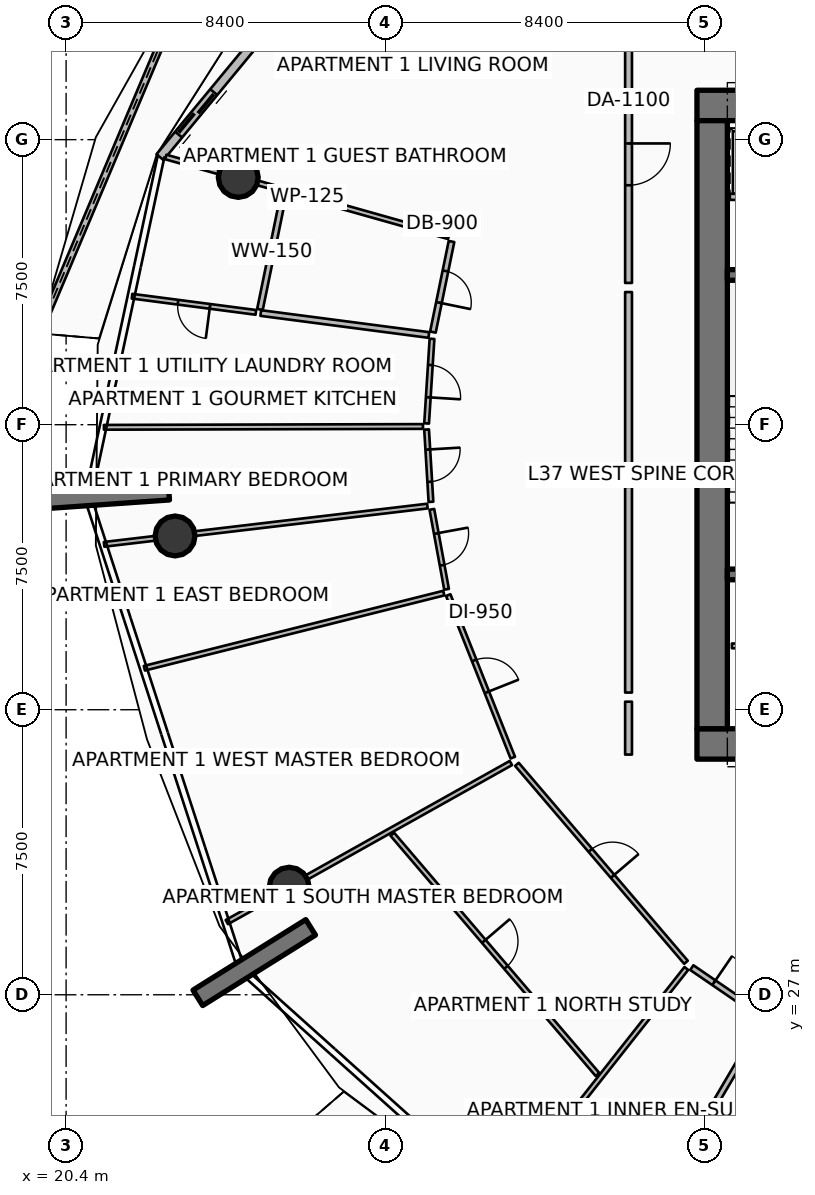
"""IFC4 building model, lengths in metres.
Left out: names, types, materials, properties, quantities, classifications, styles, units other than length and angle.
Written with IfcOpenShell. Run it as: python <this file> out.ifc"""

import sys

from ifc_helpers import new_model, si_unit, direction, frame, frame_2d, origin, origin_2d, place, context, subcontext, project, spatial, polyline, rectangle, circle, outline, extrude, element, fill, save


model = new_model("IFC4")
c1 = context("Model", 3, precision=1e-05, world=origin(), true_north=direction((0.0, 1.0)))
c2 = subcontext(c1, "Body", "Model", "MODEL_VIEW")
j1 = project(units=[si_unit("LENGTHUNIT", "METRE"), si_unit("PLANEANGLEUNIT", "RADIAN")], contexts=[c1])
p1 = place(None, origin())
s1 = spatial("IfcSite", under=j1, at=p1, CompositionType="ELEMENT")
p2 = place(p1, origin())
s2 = spatial("IfcBuilding", under=s1, at=p2, CompositionType="ELEMENT")
p3 = place(p2, frame((0.0, 0.0, 150.3)))
s3 = spatial("IfcBuildingStorey", under=s2, at=p3, CompositionType="ELEMENT", Elevation=150.3)
for number, where, z_axis, x_axis in (
    (1, (37.0, 33.6, 0.0), (0.0, 0.0, 1.0), (1.0, 0.0, 0.0)),
    (2, (37.0, 50.4, 0.0), (0.0, 0.0, 1.0), (1.0, 0.0, 0.0)),
):
    element("IfcWall", number, at=place(p3, frame(where, z_axis=z_axis, x_axis=x_axis)), inside=s3, PredefinedType="SHEAR", context=c2, shape_type="SweptSolid", body=[
        extrude(rectangle(XDim=9.9, YDim=0.8, at=frame_2d((4.95, 0.0))), origin(), (0.0, 0.0, 1.0), 3.75),
    ])
p4 = place(p3, frame((37.4, 34.0, 0.0), z_axis=(0.0, 0.0, 1.0), x_axis=(0.0, 1.0, 0.0)))
e3 = element("IfcWall", 3, at=p4, inside=s3, PredefinedType="SHEAR", context=c2, shape_type="SweptSolid", body=[
    extrude(rectangle(XDim=16.0, YDim=0.8, at=frame_2d((8.0, 0.0))), origin(), (0.0, 0.0, 1.0), 3.75),
])
for number, where, z_axis, x_axis in (
    (4, (37.8, 38.06, 0.0), (0.0, 0.0, 1.0), (1.0, 0.0, 0.0)),
    (5, (37.8, 45.94, 0.0), (0.0, 0.0, 1.0), (1.0, 0.0, 0.0)),
):
    element("IfcWall", number, at=place(p3, frame(where, z_axis=z_axis, x_axis=x_axis)), inside=s3, PredefinedType="SHEAR", context=c2, shape_type="SweptSolid", body=[
        extrude(rectangle(XDim=3.5, YDim=0.28, at=frame_2d((1.75, 0.0))), origin(), (0.0, 0.0, 1.0), 3.75),
    ])
for number, where, z_axis, x_axis in (
    (6, (23.103, 40.259, 0.0), (0.0, 0.0, 1.0), (-0.998, -0.07, 0.0)),
    (7, (26.835, 28.774, 0.0), (0.0, 0.0, 1.0), (-0.848, -0.53, 0.0)),
):
    element("IfcWall", number, at=place(p3, frame(where, z_axis=z_axis, x_axis=x_axis)), inside=s3, PredefinedType="SOLIDWALL", context=c2, shape_type="SweptSolid", body=[
        extrude(rectangle(XDim=3.5, YDim=0.48, at=frame_2d((1.75, 0.0))), origin(), (0.0, 0.0, 1.0), 3.75),
    ])
for number, where, z_axis, x_axis in (
    (8, (24.93, 48.506, 0.0), (0.0, 0.0, 1.0), (1.0, 0.0, 0.0)),
    (9, (23.267, 39.073, 0.0), (0.0, 0.0, 1.0), (1.0, 0.0, 0.0)),
    (10, (26.27, 29.831, 0.0), (0.0, 0.0, 1.0), (1.0, 0.0, 0.0)),
):
    element("IfcColumn", number, at=place(p3, frame(where, z_axis=z_axis, x_axis=x_axis)), inside=s3, PredefinedType="COLUMN", context=c2, shape_type="SweptSolid", body=[
        extrude(circle(Radius=0.525, at=origin_2d()), origin(), (0.0, 0.0, 1.0), 3.5),
    ])
p5 = place(p3, frame((23.804, 54.194, 0.0), z_axis=(0.0, 0.0, 1.0), x_axis=(-0.388680391431, -0.921372646282, 0.0)))
e11 = element("IfcWall", 11, at=p5, inside=s3, PredefinedType="PARAPET", context=c2, shape_type="SweptSolid", body=[
    extrude(outline(polyline([(0.0, 0.0), (10.626, 0.0), (10.626, 1.12), (5.313, 1.182), (0.0, 1.348), (0.0, 0.0)])), frame((0.0, 0.09, 0.0), z_axis=(0.0, -1.0, 0.0), x_axis=(1.0, 0.0, 0.0)), (0.0, 0.0, 1.0), 0.18),
])
p6 = place(p3, frame((29.291, 56.813, 0.0), z_axis=(0.0, 0.0, 1.0), x_axis=(-0.636771922292, -0.77105221547, 0.0)))
e12 = element("IfcWall", 12, at=p6, inside=s3, PredefinedType="SOLIDWALL", context=c2, shape_type="SweptSolid", body=[
    extrude(rectangle(XDim=10.082, YDim=0.24, at=frame_2d((5.041, 0.0))), origin(), (0.0, 0.0, 1.0), 2.45),
])
p7 = place(p6, frame((7.862, 0.0, 0.0)))
e13 = element("IfcOpeningElement", 13, at=p7, cuts=e12, PredefinedType="OPENING", context=c2, shape_type="SweptSolid", body=[
    extrude(rectangle(XDim=1.45, YDim=2.15, at=frame_2d((0.725, 1.075))), frame((0.0, 0.13, 0.0), z_axis=(0.0, -1.0, 0.0), x_axis=(1.0, 0.0, 0.0)), (0.0, 0.0, 1.0), 0.26),
])
p8 = place(p6, frame((0.28, 0.0, 0.65)))
e14 = element("IfcOpeningElement", 14, at=p8, cuts=e12, PredefinedType="OPENING", context=c2, shape_type="SweptSolid", body=[
    extrude(rectangle(XDim=1.6, YDim=1.5, at=frame_2d((0.8, 0.75))), frame((0.0, 0.13, 0.0), z_axis=(0.0, -1.0, 0.0), x_axis=(1.0, 0.0, 0.0)), (0.0, 0.0, 1.0), 0.26),
])
p9 = place(p3, frame((39.975, 47.995, 0.0), z_axis=(0.0, 0.0, 1.0), x_axis=(-1.0, 0.0, 0.0)))
e15 = element("IfcWall", 15, at=p9, inside=s3, PredefinedType="PARTITIONING", context=c2, shape_type="SweptSolid", body=[
    extrude(rectangle(XDim=2.11, YDim=0.16, at=frame_2d((1.055, 0.0))), origin(), (0.0, 0.0, 1.0), 3.5),
])
p10 = place(p9, frame((0.505, 0.0, 0.0)))
e16 = element("IfcOpeningElement", 16, at=p10, cuts=e15, PredefinedType="OPENING", context=c2, shape_type="SweptSolid", body=[
    extrude(rectangle(XDim=1.1, YDim=2.1, at=frame_2d((0.55, 1.05))), frame((0.0, 0.09, 0.0), z_axis=(0.0, -1.0, 0.0), x_axis=(1.0, 0.0, 0.0)), (0.0, 0.0, 1.0), 0.18),
])
p11 = place(p3, frame((37.92, 36.18, 0.0), z_axis=(0.0, 0.0, 1.0), x_axis=(1.0, 0.0, 0.0)))
e17 = element("IfcWall", 17, at=p11, inside=s3, PredefinedType="PARTITIONING", context=c2, shape_type="SweptSolid", body=[
    extrude(rectangle(XDim=3.33, YDim=0.125, at=frame_2d((1.665, 0.0))), origin(), (0.0, 0.0, 1.0), 2.94),
])
p12 = place(p11, frame((1.24, 0.0, 0.0)))
e18 = element("IfcOpeningElement", 18, at=p12, cuts=e17, PredefinedType="OPENING", context=c2, shape_type="SweptSolid", body=[
    extrude(rectangle(XDim=0.85, YDim=2.06, at=frame_2d((0.425, 1.03))), frame((0.0, 0.073, 0.0), z_axis=(0.0, -1.0, 0.0), x_axis=(1.0, 0.0, 0.0)), (0.0, 0.0, 1.0), 0.145),
])
p13 = place(p3, frame((35.2, 51.971, 0.0), z_axis=(0.0, 0.0, 1.0), x_axis=(0.0, -1.0, 0.0)))
e19 = element("IfcWall", 19, at=p13, inside=s3, PredefinedType="PARTITIONING", context=c2, shape_type="SweptSolid", body=[
    extrude(rectangle(XDim=6.241, YDim=0.18, at=frame_2d((3.12, 0.0))), origin(), (0.0, 0.0, 1.0), 2.94),
])
p14 = place(p13, frame((2.57, 0.0, 0.0)))
e20 = element("IfcOpeningElement", 20, at=p14, cuts=e19, PredefinedType="OPENING", context=c2, shape_type="SweptSolid", body=[
    extrude(rectangle(XDim=1.1, YDim=2.1, at=frame_2d((0.55, 1.05))), frame((0.0, 0.1, 0.0), z_axis=(0.0, -1.0, 0.0), x_axis=(1.0, 0.0, 0.0)), (0.0, 0.0, 1.0), 0.2),
])
p15 = place(p3, frame((35.2, 45.49, 0.0), z_axis=(0.0, 0.0, 1.0), x_axis=(0.0, -1.0, 0.0)))
e21 = element("IfcWall", 21, at=p15, inside=s3, PredefinedType="PARTITIONING", context=c2, shape_type="SweptSolid", body=[
    extrude(rectangle(XDim=4.885, YDim=0.18, at=frame_2d((2.442, 0.0))), origin(), (0.0, 0.0, 1.0), 2.94),
])
p16 = place(p3, frame((30.465, 46.945, 0.0), z_axis=(0.0, 0.0, 1.0), x_axis=(-0.962456021196, 0.271437667363, 0.0)))
e22 = element("IfcWall", 22, at=p16, inside=s3, PredefinedType="PARTITIONING", context=c2, shape_type="SweptSolid", body=[
    extrude(rectangle(XDim=7.732, YDim=0.125, at=frame_2d((3.866, 0.0))), origin(), (0.0, 0.0, 1.0), 2.94),
])
p17 = place(p3, frame((30.541, 46.82, 0.0), z_axis=(0.0, 0.0, 1.0), x_axis=(-0.201072520907, -0.979576358094, 0.0)))
e23 = element("IfcWall", 23, at=p17, inside=s3, PredefinedType="PARTITIONING", context=c2, shape_type="SweptSolid", body=[
    extrude(rectangle(XDim=2.433, YDim=0.15, at=frame_2d((1.217, 0.0))), origin(), (0.0, 0.0, 1.0), 2.94),
])
p18 = place(p17, frame((0.792, 0.0, 0.0)))
e24 = element("IfcOpeningElement", 24, at=p18, cuts=e23, PredefinedType="OPENING", context=c2, shape_type="SweptSolid", body=[
    extrude(rectangle(XDim=0.85, YDim=2.06, at=frame_2d((0.425, 1.03))), frame((0.0, 0.085, 0.0), z_axis=(0.0, -1.0, 0.0), x_axis=(1.0, 0.0, 0.0)), (0.0, 0.0, 1.0), 0.17),
])
p19 = place(p3, frame((26.124, 48.066, 0.0), z_axis=(0.0, 0.0, 1.0), x_axis=(-0.201054681034, -0.979580019822, 0.0)))
e25 = element("IfcWall", 25, at=p19, inside=s3, PredefinedType="PARTITIONING", context=c2, shape_type="SweptSolid", body=[
    extrude(rectangle(XDim=3.098, YDim=0.15, at=frame_2d((1.549, 0.0))), origin(), (0.0, 0.0, 1.0), 2.94),
])
p20 = place(p3, frame((29.945, 44.36, 0.0), z_axis=(0.0, 0.0, 1.0), x_axis=(-0.991563130501, 0.129624682181, 0.0)))
e26 = element("IfcWall", 26, at=p20, inside=s3, PredefinedType="PARTITIONING", context=c2, shape_type="SweptSolid", body=[
    extrude(rectangle(XDim=4.46, YDim=0.15, at=frame_2d((2.23, 0.0))), origin(), (0.0, 0.0, 1.0), 2.94),
])
p21 = place(p3, frame((25.393, 44.955, 0.0), z_axis=(0.0, 0.0, 1.0), x_axis=(-0.991560176963, 0.12964727325, 0.0)))
e27 = element("IfcWall", 27, at=p21, inside=s3, PredefinedType="PARTITIONING", context=c2, shape_type="SweptSolid", body=[
    extrude(rectangle(XDim=3.286, YDim=0.125, at=frame_2d((1.643, 0.0))), origin(), (0.0, 0.0, 1.0), 2.94),
])
p22 = place(p21, frame((1.218, 0.0, 0.0)))
e28 = element("IfcOpeningElement", 28, at=p22, cuts=e27, PredefinedType="OPENING", context=c2, shape_type="SweptSolid", body=[
    extrude(rectangle(XDim=0.85, YDim=2.06, at=frame_2d((0.425, 1.03))), frame((0.0, 0.073, 0.0), z_axis=(0.0, -1.0, 0.0), x_axis=(1.0, 0.0, 0.0)), (0.0, 0.0, 1.0), 0.145),
])
p23 = place(p3, frame((29.791, 41.953, 0.0), z_axis=(0.0, 0.0, 1.0), x_axis=(-0.999996651439, -0.0025878777, 0.0)))
e29 = element("IfcWall", 29, at=p23, inside=s3, PredefinedType="PARTITIONING", context=c2, shape_type="SweptSolid", body=[
    extrude(rectangle(XDim=8.396, YDim=0.125, at=frame_2d((4.198, 0.0))), origin(), (0.0, 0.0, 1.0), 2.94),
])
p24 = place(p3, frame((30.028, 44.259, 0.0), z_axis=(0.0, 0.0, 1.0), x_axis=(-0.063707112834, -0.997968638673, 0.0)))
e30 = element("IfcWall", 30, at=p24, inside=s3, PredefinedType="PARTITIONING", context=c2, shape_type="SweptSolid", body=[
    extrude(rectangle(XDim=2.23, YDim=0.125, at=frame_2d((1.115, 0.0))), origin(), (0.0, 0.0, 1.0), 2.94),
])
p25 = place(p24, frame((0.69, 0.0, 0.0)))
e31 = element("IfcOpeningElement", 31, at=p25, cuts=e30, PredefinedType="OPENING", context=c2, shape_type="SweptSolid", body=[
    extrude(rectangle(XDim=0.85, YDim=2.06, at=frame_2d((0.425, 1.03))), frame((0.0, 0.073, 0.0), z_axis=(0.0, -1.0, 0.0), x_axis=(1.0, 0.0, 0.0)), (0.0, 0.0, 1.0), 0.145),
])
p26 = place(p3, frame((29.886, 41.873, 0.0), z_axis=(0.0, 0.0, 1.0), x_axis=(0.060058165276, -0.998194879161, 0.0)))
e32 = element("IfcWall", 32, at=p26, inside=s3, PredefinedType="PARTITIONING", context=c2, shape_type="SweptSolid", body=[
    extrude(rectangle(XDim=1.906, YDim=0.125, at=frame_2d((0.953, 0.0))), origin(), (0.0, 0.0, 1.0), 2.94),
])
p27 = place(p26, frame((0.528, 0.0, 0.0)))
e33 = element("IfcOpeningElement", 33, at=p27, cuts=e32, PredefinedType="OPENING", context=c2, shape_type="SweptSolid", body=[
    extrude(rectangle(XDim=0.85, YDim=2.06, at=frame_2d((0.425, 1.03))), frame((0.0, 0.073, 0.0), z_axis=(0.0, -1.0, 0.0), x_axis=(1.0, 0.0, 0.0)), (0.0, 0.0, 1.0), 0.145),
])
p28 = place(p3, frame((35.2, 40.365, 0.0), z_axis=(0.0, 0.0, 1.0), x_axis=(0.0, -1.0, 0.0)))
e34 = element("IfcWall", 34, at=p28, inside=s3, PredefinedType="PARTITIONING", context=c2, shape_type="SweptSolid", body=[
    extrude(rectangle(XDim=5.413, YDim=0.18, at=frame_2d((2.707, 0.0))), origin(), (0.0, 0.0, 1.0), 2.94),
])
p29 = place(p3, frame((29.907, 39.858, 0.0), z_axis=(0.0, 0.0, 1.0), x_axis=(-0.993070228419, -0.117522429465, 0.0)))
e35 = element("IfcWall", 35, at=p29, inside=s3, PredefinedType="PARTITIONING", context=c2, shape_type="SweptSolid", body=[
    extrude(rectangle(XDim=8.567, YDim=0.125, at=frame_2d((4.284, 0.0))), origin(), (0.0, 0.0, 1.0), 2.94),
])
p30 = place(p3, frame((30.338, 37.569, 0.0), z_axis=(0.0, 0.0, 1.0), x_axis=(-0.969940631235, -0.243341677236, 0.0)))
e36 = element("IfcWall", 36, at=p30, inside=s3, PredefinedType="PARTITIONING", context=c2, shape_type="SweptSolid", body=[
    extrude(rectangle(XDim=8.124, YDim=0.125, at=frame_2d((4.062, 0.0))), origin(), (0.0, 0.0, 1.0), 2.94),
])
p31 = place(p3, frame((30.025, 39.772, 0.0), z_axis=(0.0, 0.0, 1.0), x_axis=(0.180764237825, -0.983526456341, 0.0)))
e37 = element("IfcWall", 37, at=p31, inside=s3, PredefinedType="PARTITIONING", context=c2, shape_type="SweptSolid", body=[
    extrude(rectangle(XDim=2.138, YDim=0.125, at=frame_2d((1.069, 0.0))), origin(), (0.0, 0.0, 1.0), 2.94),
])
p32 = place(p31, frame((0.644, 0.0, 0.0)))
e38 = element("IfcOpeningElement", 38, at=p32, cuts=e37, PredefinedType="OPENING", context=c2, shape_type="SweptSolid", body=[
    extrude(rectangle(XDim=0.85, YDim=2.06, at=frame_2d((0.425, 1.03))), frame((0.0, 0.073, 0.0), z_axis=(0.0, -1.0, 0.0), x_axis=(1.0, 0.0, 0.0)), (0.0, 0.0, 1.0), 0.145),
])
p33 = place(p3, frame((30.455, 37.516, 0.0), z_axis=(0.0, 0.0, 1.0), x_axis=(0.369249273076, -0.929330390299, 0.0)))
e39 = element("IfcWall", 39, at=p33, inside=s3, PredefinedType="PARTITIONING", context=c2, shape_type="SweptSolid", body=[
    extrude(rectangle(XDim=4.602, YDim=0.125, at=frame_2d((2.301, 0.0))), origin(), (0.0, 0.0, 1.0), 2.94),
])
p34 = place(p33, frame((1.851, 0.0, 0.0)))
e40 = element("IfcOpeningElement", 40, at=p34, cuts=e39, PredefinedType="OPENING", context=c2, shape_type="SweptSolid", body=[
    extrude(rectangle(XDim=0.9, YDim=2.08, at=frame_2d((0.45, 1.04))), frame((0.0, 0.073, 0.0), z_axis=(0.0, -1.0, 0.0), x_axis=(1.0, 0.0, 0.0)), (0.0, 0.0, 1.0), 0.145),
])
p35 = place(p3, frame((35.2, 34.712, 0.0), z_axis=(0.0, 0.0, 1.0), x_axis=(0.0, -1.0, 0.0)))
e41 = element("IfcWall", 41, at=p35, inside=s3, PredefinedType="PARTITIONING", context=c2, shape_type="SweptSolid", body=[
    extrude(rectangle(XDim=1.392, YDim=0.18, at=frame_2d((0.696, 0.0))), origin(), (0.0, 0.0, 1.0), 2.94),
])
p36 = place(p3, frame((32.104, 33.098, 0.0), z_axis=(0.0, 0.0, 1.0), x_axis=(-0.872488035617, -0.488635475283, 0.0)))
e42 = element("IfcWall", 42, at=p36, inside=s3, PredefinedType="PARTITIONING", context=c2, shape_type="SweptSolid", body=[
    extrude(rectangle(XDim=8.567, YDim=0.125, at=frame_2d((4.284, 0.0))), origin(), (0.0, 0.0, 1.0), 2.94),
])
p37 = place(p3, frame((32.263, 33.063, 0.0), z_axis=(0.0, 0.0, 1.0), x_axis=(0.649448927448, -0.760405214762, 0.0)))
e43 = element("IfcWall", 43, at=p37, inside=s3, PredefinedType="PARTITIONING", context=c2, shape_type="SweptSolid", body=[
    extrude(rectangle(XDim=6.85, YDim=0.125, at=frame_2d((3.425, 0.0))), origin(), (0.0, 0.0, 1.0), 2.94),
])
p38 = place(p37, frame((2.975, 0.0, 0.0)))
e44 = element("IfcOpeningElement", 44, at=p38, cuts=e43, PredefinedType="OPENING", context=c2, shape_type="SweptSolid", body=[
    extrude(rectangle(XDim=0.9, YDim=2.08, at=frame_2d((0.45, 1.04))), frame((0.0, 0.073, 0.0), z_axis=(0.0, -1.0, 0.0), x_axis=(1.0, 0.0, 0.0)), (0.0, 0.0, 1.0), 0.145),
])
p39 = place(p3, frame((28.982, 31.226, 0.0), z_axis=(0.0, 0.0, 1.0), x_axis=(0.649429273824, -0.760422000142, 0.0)))
e45 = element("IfcWall", 45, at=p39, inside=s3, PredefinedType="PARTITIONING", context=c2, shape_type="SweptSolid", body=[
    extrude(rectangle(XDim=8.317, YDim=0.125, at=frame_2d((4.158, 0.0))), origin(), (0.0, 0.0, 1.0), 2.94),
])
p40 = place(p39, frame((3.708, 0.0, 0.0)))
e46 = element("IfcOpeningElement", 46, at=p40, cuts=e45, PredefinedType="OPENING", context=c2, shape_type="SweptSolid", body=[
    extrude(rectangle(XDim=0.9, YDim=2.08, at=frame_2d((0.45, 1.04))), frame((0.0, 0.073, 0.0), z_axis=(0.0, -1.0, 0.0), x_axis=(1.0, 0.0, 0.0)), (0.0, 0.0, 1.0), 0.145),
])
p41 = place(p3, frame((36.721, 27.692, 0.0), z_axis=(0.0, 0.0, 1.0), x_axis=(-0.619091325953, -0.785318998962, 0.0)))
e47 = element("IfcWall", 47, at=p41, inside=s3, PredefinedType="PARTITIONING", context=c2, shape_type="SweptSolid", body=[
    extrude(rectangle(XDim=7.833, YDim=0.125, at=frame_2d((3.917, 0.0))), origin(), (0.0, 0.0, 1.0), 2.94),
])
p42 = place(p3, frame((36.865, 27.714, 0.0), z_axis=(0.0, 0.0, 1.0), x_axis=(0.825296643152, -0.564699434037, 0.0)))
e48 = element("IfcWall", 48, at=p42, inside=s3, PredefinedType="PARTITIONING", context=c2, shape_type="SweptSolid", body=[
    extrude(rectangle(XDim=2.256, YDim=0.15, at=frame_2d((1.128, 0.0))), origin(), (0.0, 0.0, 1.0), 2.94),
])
p43 = place(p42, frame((0.703, 0.0, 0.0)))
e49 = element("IfcOpeningElement", 49, at=p43, cuts=e48, PredefinedType="OPENING", context=c2, shape_type="SweptSolid", body=[
    extrude(rectangle(XDim=0.85, YDim=2.06, at=frame_2d((0.425, 1.03))), frame((0.0, 0.085, 0.0), z_axis=(0.0, -1.0, 0.0), x_axis=(1.0, 0.0, 0.0)), (0.0, 0.0, 1.0), 0.17),
])
p44 = place(p3, frame((34.023, 24.11, 0.0), z_axis=(0.0, 0.0, 1.0), x_axis=(0.825328087742, -0.564653475667, 0.0)))
e50 = element("IfcWall", 50, at=p44, inside=s3, PredefinedType="PARTITIONING", context=c2, shape_type="SweptSolid", body=[
    extrude(rectangle(XDim=2.875, YDim=0.15, at=frame_2d((1.438, 0.0))), origin(), (0.0, 0.0, 1.0), 2.94),
])
p45 = place(p3, frame((38.756, 26.312, 0.0), z_axis=(0.0, 0.0, 1.0), x_axis=(-0.507701739566, -0.8615329034, 0.0)))
e51 = element("IfcWall", 51, at=p45, inside=s3, PredefinedType="PARTITIONING", context=c2, shape_type="SweptSolid", body=[
    extrude(rectangle(XDim=4.46, YDim=0.15, at=frame_2d((2.23, 0.0))), origin(), (0.0, 0.0, 1.0), 2.94),
])
p46 = place(p7, origin())
e52 = element("IfcDoor", 52, at=p46, inside=s3, OperationType="DOUBLE_DOOR_SLIDING", PredefinedType="DOOR", context=c2, shape_type="SweptSolid", body=[
    extrude(rectangle(XDim=1.45, YDim=2.15, at=frame_2d((0.725, 1.075))), frame((0.0, 0.025, 0.0), z_axis=(0.0, -1.0, 0.0), x_axis=(1.0, 0.0, 0.0)), (0.0, 0.0, 1.0), 0.05),
])
fill(e13, e52)
p47 = place(p14, origin())
e53 = element("IfcDoor", 53, at=p47, inside=s3, OperationType="SINGLE_SWING_LEFT", PredefinedType="DOOR", context=c2, shape_type="SweptSolid", body=[
    extrude(rectangle(XDim=1.1, YDim=2.1, at=frame_2d((0.55, 1.05))), frame((0.0, 0.025, 0.0), z_axis=(0.0, -1.0, 0.0), x_axis=(1.0, 0.0, 0.0)), (0.0, 0.0, 1.0), 0.05),
])
fill(e20, e53)
p48 = place(p18, origin())
e54 = element("IfcDoor", 54, at=p48, inside=s3, OperationType="SINGLE_SWING_RIGHT", PredefinedType="DOOR", context=c2, shape_type="SweptSolid", body=[
    extrude(rectangle(XDim=0.85, YDim=2.06, at=frame_2d((0.425, 1.03))), frame((0.0, 0.025, 0.0), z_axis=(0.0, -1.0, 0.0), x_axis=(1.0, 0.0, 0.0)), (0.0, 0.0, 1.0), 0.05),
])
fill(e24, e54)
p49 = place(p22, origin())
e55 = element("IfcDoor", 55, at=p49, inside=s3, OperationType="SINGLE_SWING_LEFT", PredefinedType="DOOR", context=c2, shape_type="SweptSolid", body=[
    extrude(rectangle(XDim=0.85, YDim=2.06, at=frame_2d((0.425, 1.03))), frame((0.0, 0.025, 0.0), z_axis=(0.0, -1.0, 0.0), x_axis=(1.0, 0.0, 0.0)), (0.0, 0.0, 1.0), 0.05),
])
fill(e28, e55)
p50 = place(p25, origin())
e56 = element("IfcDoor", 56, at=p50, inside=s3, OperationType="SINGLE_SWING_RIGHT", PredefinedType="DOOR", context=c2, shape_type="SweptSolid", body=[
    extrude(rectangle(XDim=0.85, YDim=2.06, at=frame_2d((0.425, 1.03))), frame((0.0, 0.025, 0.0), z_axis=(0.0, -1.0, 0.0), x_axis=(1.0, 0.0, 0.0)), (0.0, 0.0, 1.0), 0.05),
])
fill(e31, e56)
p51 = place(p27, origin())
e57 = element("IfcDoor", 57, at=p51, inside=s3, OperationType="SINGLE_SWING_LEFT", PredefinedType="DOOR", context=c2, shape_type="SweptSolid", body=[
    extrude(rectangle(XDim=0.85, YDim=2.06, at=frame_2d((0.425, 1.03))), frame((0.0, 0.025, 0.0), z_axis=(0.0, -1.0, 0.0), x_axis=(1.0, 0.0, 0.0)), (0.0, 0.0, 1.0), 0.05),
])
fill(e33, e57)
p52 = place(p32, origin())
e58 = element("IfcDoor", 58, at=p52, inside=s3, OperationType="SINGLE_SWING_LEFT", PredefinedType="DOOR", context=c2, shape_type="SweptSolid", body=[
    extrude(rectangle(XDim=0.85, YDim=2.06, at=frame_2d((0.425, 1.03))), frame((0.0, 0.025, 0.0), z_axis=(0.0, -1.0, 0.0), x_axis=(1.0, 0.0, 0.0)), (0.0, 0.0, 1.0), 0.05),
])
fill(e38, e58)
p53 = place(p34, origin())
e59 = element("IfcDoor", 59, at=p53, inside=s3, OperationType="SINGLE_SWING_RIGHT", PredefinedType="DOOR", context=c2, shape_type="SweptSolid", body=[
    extrude(rectangle(XDim=0.9, YDim=2.08, at=frame_2d((0.45, 1.04))), frame((0.0, 0.025, 0.0), z_axis=(0.0, -1.0, 0.0), x_axis=(1.0, 0.0, 0.0)), (0.0, 0.0, 1.0), 0.05),
])
fill(e40, e59)
p54 = place(p38, origin())
e60 = element("IfcDoor", 60, at=p54, inside=s3, OperationType="SINGLE_SWING_RIGHT", PredefinedType="DOOR", context=c2, shape_type="SweptSolid", body=[
    extrude(rectangle(XDim=0.9, YDim=2.08, at=frame_2d((0.45, 1.04))), frame((0.0, 0.025, 0.0), z_axis=(0.0, -1.0, 0.0), x_axis=(1.0, 0.0, 0.0)), (0.0, 0.0, 1.0), 0.05),
])
fill(e44, e60)
p55 = place(p40, origin())
e61 = element("IfcDoor", 61, at=p55, inside=s3, OperationType="SINGLE_SWING_LEFT", PredefinedType="DOOR", context=c2, shape_type="SweptSolid", body=[
    extrude(rectangle(XDim=0.9, YDim=2.08, at=frame_2d((0.45, 1.04))), frame((0.0, 0.025, 0.0), z_axis=(0.0, -1.0, 0.0), x_axis=(1.0, 0.0, 0.0)), (0.0, 0.0, 1.0), 0.05),
])
fill(e46, e61)
p56 = place(p43, origin())
e62 = element("IfcDoor", 62, at=p56, inside=s3, OperationType="SINGLE_SWING_LEFT", PredefinedType="DOOR", context=c2, shape_type="SweptSolid", body=[
    extrude(rectangle(XDim=0.85, YDim=2.06, at=frame_2d((0.425, 1.03))), frame((0.0, 0.025, 0.0), z_axis=(0.0, -1.0, 0.0), x_axis=(1.0, 0.0, 0.0)), (0.0, 0.0, 1.0), 0.05),
])
fill(e49, e62)
save(model, sys.argv[1])
